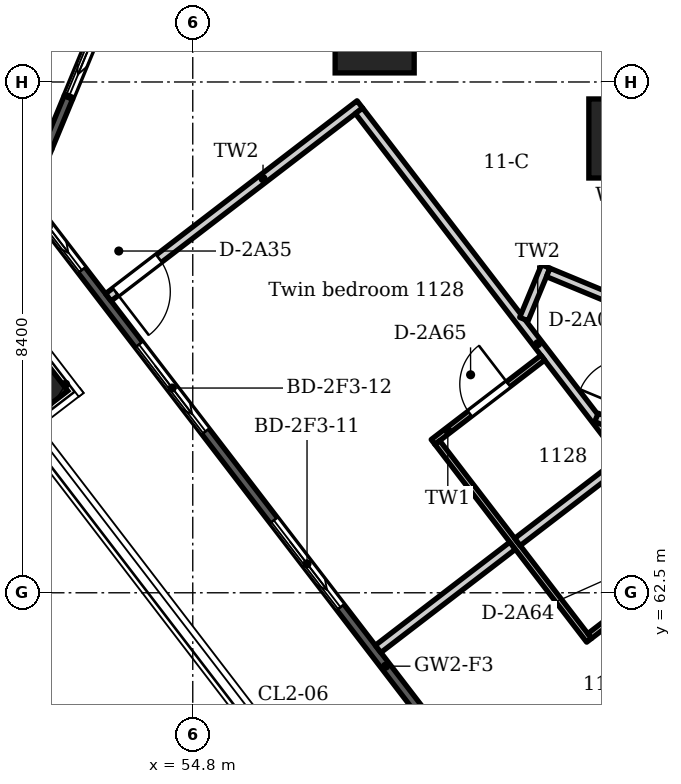
"""IFC4 building model, lengths in metres.
Left out: names, types, materials, properties, quantities, classifications, styles, units other than length and angle.
Written with IfcOpenShell. Run it as: python <this file> out.ifc"""

import sys

from ifc_helpers import new_model, si_unit, direction, frame, frame_2d, origin, origin_2d, place, context, subcontext, project, spatial, polyline, rectangle, circle, outline, extrude, element, fill, save


model = new_model("IFC4")
c1 = context("Model", 3, precision=1e-05, world=origin(), true_north=direction((0.0, 1.0)))
c2 = subcontext(c1, "Body", "Model", "MODEL_VIEW")
j1 = project(units=[si_unit("LENGTHUNIT", "METRE"), si_unit("PLANEANGLEUNIT", "RADIAN")], contexts=[c1])
p1 = place(None, origin())
s1 = spatial("IfcSite", under=j1, at=p1, CompositionType="ELEMENT")
p2 = place(p1, origin())
s2 = spatial("IfcBuilding", under=s1, at=p2, CompositionType="ELEMENT")
p3 = place(p2, frame((0.0, 0.0, 50.4)))
s3 = spatial("IfcBuildingStorey", under=s2, at=p3, CompositionType="ELEMENT", Elevation=50.4)
p4 = place(p3, frame((52.188, 65.929, -0.35), z_axis=(0.0, 0.0, 1.0), x_axis=(-0.608761429009, 0.793353340291, 0.0)))
e1 = element("IfcColumn", 1, at=p4, inside=s3, PredefinedType="COLUMN", context=c2, shape_type="SweptSolid", body=[
    extrude(rectangle(XDim=0.85, YDim=0.75, at=origin_2d()), origin(), (0.0, 0.0, 1.0), 3.95),
])
for number, where, z_axis, x_axis in (
    (2, (61.964, 69.971, -0.35), (0.0, 0.0, 1.0), (1.0, 0.0, 0.0)),
    (3, (57.791, 71.699, -0.35), (0.0, 0.0, 1.0), (1.0, 0.0, 0.0)),
):
    element("IfcColumn", number, at=place(p3, frame(where, z_axis=z_axis, x_axis=x_axis)), inside=s3, PredefinedType="COLUMN", context=c2, shape_type="SweptSolid", body=[
        extrude(circle(Radius=0.65, at=origin_2d()), origin(), (0.0, 0.0, 1.0), 3.95),
    ])
p5 = place(p3, frame((52.372, 69.722, 0.0), z_axis=(0.0, 0.0, 1.0), x_axis=(0.382603377961, 0.923912688068, 0.0)))
e4 = element("IfcWall", 4, at=p5, inside=s3, PredefinedType="SOLIDWALL", context=c2, shape_type="SweptSolid", body=[
    extrude(outline(polyline([(0.11, -0.075), (1.0, -0.075), (1.0, 0.075), (0.11, 0.075), (0.11, -0.075)])), origin(), (0.0, 0.0, 1.0), 3.3),
])
p6 = place(p3, frame((52.755, 70.646, 0.0), z_axis=(0.0, 0.0, 1.0), x_axis=(0.382771661121, 0.923842982028, 0.0)))
e5 = element("IfcWall", 5, at=p6, inside=s3, PredefinedType="SOLIDWALL", context=c2, shape_type="SweptSolid", body=[
    extrude(outline(polyline([(0.0, -0.075), (1.9, -0.075), (1.9, 0.075), (0.0, 0.075), (0.0, -0.075)])), origin(), (0.0, 0.0, 1.0), 2.65),
])
p7 = place(p6, frame((0.05, 0.0, 0.0)))
e6 = element("IfcOpeningElement", 6, at=p7, cuts=e5, PredefinedType="OPENING", context=c2, shape_type="SweptSolid", body=[
    extrude(rectangle(XDim=1.8, YDim=2.6, at=frame_2d((0.9, 1.3))), frame((0.0, 0.085, 0.0), z_axis=(0.0, -1.0, 0.0), x_axis=(1.0, 0.0, 0.0)), (0.0, 0.0, 1.0), 0.17),
])
p8 = place(p3, frame((79.969, 32.624, 0.0), z_axis=(0.0, 0.0, 1.0), x_axis=(-0.608761526367, 0.793353265585, 0.0)))
e7 = element("IfcWall", 7, at=p8, inside=s3, PredefinedType="SOLIDWALL", context=c2, shape_type="SweptSolid", body=[
    extrude(outline(polyline([(0.149, 0.075), (0.149, -0.075), (47.217, -0.075), (47.217, 0.075), (0.149, 0.075)])), origin(), (0.0, 0.0, 1.0), 3.3),
])
p9 = place(p8, frame((1.222, 0.0, 0.0)))
e8 = element("IfcOpeningElement", 8, at=p9, cuts=e7, PredefinedType="OPENING", context=c2, shape_type="SweptSolid", body=[
    extrude(rectangle(XDim=1.8, YDim=2.6, at=frame_2d((0.9, 1.3))), frame((0.0, 0.085, 0.0), z_axis=(0.0, -1.0, 0.0), x_axis=(1.0, 0.0, 0.0)), (0.0, 0.0, 1.0), 0.17),
])
p10 = place(p8, frame((4.565, 0.0, 0.0)))
e9 = element("IfcOpeningElement", 9, at=p10, cuts=e7, PredefinedType="OPENING", context=c2, shape_type="SweptSolid", body=[
    extrude(rectangle(XDim=1.8, YDim=2.6, at=frame_2d((0.9, 1.3))), frame((0.0, 0.085, 0.0), z_axis=(0.0, -1.0, 0.0), x_axis=(1.0, 0.0, 0.0)), (0.0, 0.0, 1.0), 0.17),
])
p11 = place(p8, frame((8.209, 0.0, 0.0)))
e10 = element("IfcOpeningElement", 10, at=p11, cuts=e7, PredefinedType="OPENING", context=c2, shape_type="SweptSolid", body=[
    extrude(rectangle(XDim=1.8, YDim=2.6, at=frame_2d((0.9, 1.3))), frame((0.0, 0.085, 0.0), z_axis=(0.0, -1.0, 0.0), x_axis=(1.0, 0.0, 0.0)), (0.0, 0.0, 1.0), 0.17),
])
p12 = place(p8, frame((12.453, 0.0, 0.0)))
e11 = element("IfcOpeningElement", 11, at=p12, cuts=e7, PredefinedType="OPENING", context=c2, shape_type="SweptSolid", body=[
    extrude(rectangle(XDim=1.8, YDim=2.6, at=frame_2d((0.9, 1.3))), frame((0.0, 0.085, 0.0), z_axis=(0.0, -1.0, 0.0), x_axis=(1.0, 0.0, 0.0)), (0.0, 0.0, 1.0), 0.17),
])
p13 = place(p8, frame((15.496, 0.0, 0.0)))
e12 = element("IfcOpeningElement", 12, at=p13, cuts=e7, PredefinedType="OPENING", context=c2, shape_type="SweptSolid", body=[
    extrude(rectangle(XDim=1.8, YDim=2.6, at=frame_2d((0.9, 1.3))), frame((0.0, 0.085, 0.0), z_axis=(0.0, -1.0, 0.0), x_axis=(1.0, 0.0, 0.0)), (0.0, 0.0, 1.0), 0.17),
])
p14 = place(p8, frame((18.84, 0.0, 0.15)))
e13 = element("IfcOpeningElement", 13, at=p14, cuts=e7, PredefinedType="OPENING", context=c2, shape_type="SweptSolid", body=[
    extrude(rectangle(XDim=2.4, YDim=2.45, at=frame_2d((1.2, 1.225))), frame((0.0, 0.085, 0.0), z_axis=(0.0, -1.0, 0.0), x_axis=(1.0, 0.0, 0.0)), (0.0, 0.0, 1.0), 0.17),
])
p15 = place(p8, frame((22.783, 0.0, 0.0)))
e14 = element("IfcOpeningElement", 14, at=p15, cuts=e7, PredefinedType="OPENING", context=c2, shape_type="SweptSolid", body=[
    extrude(rectangle(XDim=1.8, YDim=2.6, at=frame_2d((0.9, 1.3))), frame((0.0, 0.085, 0.0), z_axis=(0.0, -1.0, 0.0), x_axis=(1.0, 0.0, 0.0)), (0.0, 0.0, 1.0), 0.17),
])
p16 = place(p8, frame((26.127, 0.0, 0.15)))
e15 = element("IfcOpeningElement", 15, at=p16, cuts=e7, PredefinedType="OPENING", context=c2, shape_type="SweptSolid", body=[
    extrude(rectangle(XDim=2.4, YDim=2.45, at=frame_2d((1.2, 1.225))), frame((0.0, 0.085, 0.0), z_axis=(0.0, -1.0, 0.0), x_axis=(1.0, 0.0, 0.0)), (0.0, 0.0, 1.0), 0.17),
])
p17 = place(p8, frame((30.071, 0.0, 0.0)))
e16 = element("IfcOpeningElement", 16, at=p17, cuts=e7, PredefinedType="OPENING", context=c2, shape_type="SweptSolid", body=[
    extrude(rectangle(XDim=1.8, YDim=2.6, at=frame_2d((0.9, 1.3))), frame((0.0, 0.085, 0.0), z_axis=(0.0, -1.0, 0.0), x_axis=(1.0, 0.0, 0.0)), (0.0, 0.0, 1.0), 0.17),
])
p18 = place(p8, frame((33.114, 0.0, 0.0)))
e17 = element("IfcOpeningElement", 17, at=p18, cuts=e7, PredefinedType="OPENING", context=c2, shape_type="SweptSolid", body=[
    extrude(rectangle(XDim=1.8, YDim=2.6, at=frame_2d((0.9, 1.3))), frame((0.0, 0.085, 0.0), z_axis=(0.0, -1.0, 0.0), x_axis=(1.0, 0.0, 0.0)), (0.0, 0.0, 1.0), 0.17),
])
p19 = place(p8, frame((37.358, 0.0, 0.0)))
e18 = element("IfcOpeningElement", 18, at=p19, cuts=e7, PredefinedType="OPENING", context=c2, shape_type="SweptSolid", body=[
    extrude(rectangle(XDim=1.8, YDim=2.6, at=frame_2d((0.9, 1.3))), frame((0.0, 0.085, 0.0), z_axis=(0.0, -1.0, 0.0), x_axis=(1.0, 0.0, 0.0)), (0.0, 0.0, 1.0), 0.17),
])
p20 = place(p8, frame((41.001, 0.0, 0.0)))
e19 = element("IfcOpeningElement", 19, at=p20, cuts=e7, PredefinedType="OPENING", context=c2, shape_type="SweptSolid", body=[
    extrude(rectangle(XDim=1.8, YDim=2.6, at=frame_2d((0.9, 1.3))), frame((0.0, 0.085, 0.0), z_axis=(0.0, -1.0, 0.0), x_axis=(1.0, 0.0, 0.0)), (0.0, 0.0, 1.0), 0.17),
])
p21 = place(p8, frame((44.345, 0.0, 0.0)))
e20 = element("IfcOpeningElement", 20, at=p21, cuts=e7, PredefinedType="OPENING", context=c2, shape_type="SweptSolid", body=[
    extrude(rectangle(XDim=1.8, YDim=2.6, at=frame_2d((0.9, 1.3))), frame((0.0, 0.085, 0.0), z_axis=(0.0, -1.0, 0.0), x_axis=(1.0, 0.0, 0.0)), (0.0, 0.0, 1.0), 0.17),
])
p22 = place(p3, frame((53.412, 67.358, 0.0), z_axis=(0.0, 0.0, 1.0), x_axis=(0.793382437727, 0.608723506616, 0.0)))
e21 = element("IfcWall", 21, at=p22, inside=s3, PredefinedType="PARTITIONING", context=c2, shape_type="SweptSolid", body=[
    extrude(rectangle(XDim=5.213, YDim=0.15, at=frame_2d((2.606, 0.0))), origin(), (0.0, 0.0, 1.0), 3.3),
])
p23 = place(p22, frame((0.15, 0.0, 0.0)))
e22 = element("IfcOpeningElement", 22, at=p23, cuts=e21, PredefinedType="OPENING", context=c2, shape_type="SweptSolid", body=[
    extrude(rectangle(XDim=0.9, YDim=2.1, at=frame_2d((0.45, 1.05))), frame((0.0, 0.085, 0.0), z_axis=(0.0, -1.0, 0.0), x_axis=(1.0, 0.0, 0.0)), (0.0, 0.0, 1.0), 0.17),
])
p24 = place(p3, frame((57.534, 70.427, 0.0), z_axis=(0.0, 0.0, 1.0), x_axis=(0.608794371867, -0.793328061261, 0.0)))
e23 = element("IfcWall", 23, at=p24, inside=s3, PredefinedType="PARTITIONING", context=c2, shape_type="SweptSolid", body=[
    extrude(rectangle(XDim=19.759, YDim=0.15, at=frame_2d((9.88, 0.0))), origin(), (0.0, 0.0, 1.0), 3.3),
])
p25 = place(p24, frame((18.293, 0.0, 0.0)))
e24 = element("IfcOpeningElement", 24, at=p25, cuts=e23, PredefinedType="OPENING", context=c2, shape_type="SweptSolid", body=[
    extrude(rectangle(XDim=0.9, YDim=2.1, at=frame_2d((0.45, 1.05))), frame((0.0, 0.085, 0.0), z_axis=(0.0, -1.0, 0.0), x_axis=(1.0, 0.0, 0.0)), (0.0, 0.0, 1.0), 0.17),
])
p26 = place(p24, frame((17.093, 0.0, 0.0)))
e25 = element("IfcOpeningElement", 25, at=p26, cuts=e23, PredefinedType="OPENING", context=c2, shape_type="SweptSolid", body=[
    extrude(rectangle(XDim=0.9, YDim=2.1, at=frame_2d((0.45, 1.05))), frame((0.0, 0.085, 0.0), z_axis=(0.0, -1.0, 0.0), x_axis=(1.0, 0.0, 0.0)), (0.0, 0.0, 1.0), 0.17),
])
p27 = place(p24, frame((11.006, 0.0, 0.0)))
e26 = element("IfcOpeningElement", 26, at=p27, cuts=e23, PredefinedType="OPENING", context=c2, shape_type="SweptSolid", body=[
    extrude(rectangle(XDim=0.9, YDim=2.1, at=frame_2d((0.45, 1.05))), frame((0.0, 0.085, 0.0), z_axis=(0.0, -1.0, 0.0), x_axis=(1.0, 0.0, 0.0)), (0.0, 0.0, 1.0), 0.17),
])
p28 = place(p24, frame((9.806, 0.0, 0.0)))
e27 = element("IfcOpeningElement", 27, at=p28, cuts=e23, PredefinedType="OPENING", context=c2, shape_type="SweptSolid", body=[
    extrude(rectangle(XDim=0.9, YDim=2.1, at=frame_2d((0.45, 1.05))), frame((0.0, 0.085, 0.0), z_axis=(0.0, -1.0, 0.0), x_axis=(1.0, 0.0, 0.0)), (0.0, 0.0, 1.0), 0.17),
])
p29 = place(p3, frame((57.848, 61.576, 0.0), z_axis=(0.0, 0.0, 1.0), x_axis=(0.793280814045, 0.608855935397, 0.0)))
e28 = element("IfcWall", 28, at=p29, inside=s3, PredefinedType="PARTITIONING", context=c2, shape_type="SweptSolid", body=[
    extrude(rectangle(XDim=2.789, YDim=0.15, at=frame_2d((1.395, 0.0))), origin(), (0.0, 0.0, 1.0), 3.3),
])
p30 = place(p3, frame((58.751, 64.981, 0.0), z_axis=(0.0, 0.0, 1.0), x_axis=(0.793437070432, 0.608652294224, 0.0)))
e29 = element("IfcWall", 29, at=p30, inside=s3, PredefinedType="PARTITIONING", context=c2, shape_type="SweptSolid", body=[
    extrude(rectangle(XDim=2.275, YDim=0.1, at=frame_2d((1.138, 0.0))), origin(), (0.0, 0.0, 1.0), 3.3),
])
p31 = place(p30, frame((0.762, 0.0, 0.0)))
e30 = element("IfcOpeningElement", 30, at=p31, cuts=e29, PredefinedType="OPENING", context=c2, shape_type="SweptSolid", body=[
    extrude(rectangle(XDim=0.8, YDim=2.1, at=frame_2d((0.4, 1.05))), frame((0.0, 0.06, 0.0), z_axis=(0.0, -1.0, 0.0), x_axis=(1.0, 0.0, 0.0)), (0.0, 0.0, 1.0), 0.12),
])
p32 = place(p3, frame((58.821, 64.971, 0.0), z_axis=(0.0, 0.0, 1.0), x_axis=(0.608766496324, -0.793349451978, 0.0)))
e31 = element("IfcWall", 31, at=p32, inside=s3, PredefinedType="PARTITIONING", context=c2, shape_type="SweptSolid", body=[
    extrude(rectangle(XDim=4.1, YDim=0.1, at=frame_2d((2.05, 0.0))), origin(), (0.0, 0.0, 1.0), 3.3),
])
p33 = place(p3, frame((60.066, 58.686, 0.0), z_axis=(0.0, 0.0, 1.0), x_axis=(0.793444149255, 0.608643066184, 0.0)))
e32 = element("IfcWall", 32, at=p33, inside=s3, PredefinedType="PARTITIONING", context=c2, shape_type="SweptSolid", body=[
    extrude(rectangle(XDim=5.064, YDim=0.15, at=frame_2d((2.532, 0.0))), origin(), (0.0, 0.0, 1.0), 3.3),
])
p34 = place(p3, frame((60.14, 63.335, 0.0), z_axis=(0.0, 0.0, 1.0), x_axis=(0.79342025342, 0.608674216197, 0.0)))
e33 = element("IfcWall", 33, at=p34, inside=s3, PredefinedType="PARTITIONING", context=c2, shape_type="SweptSolid", body=[
    extrude(rectangle(XDim=2.175, YDim=0.15, at=frame_2d((1.088, 0.0))), origin(), (0.0, 0.0, 1.0), 3.3),
])
p35 = place(p3, frame((60.246, 67.0, 0.0), z_axis=(0.0, 0.0, 1.0), x_axis=(0.383080061035, 0.923715143774, 0.0)))
e34 = element("IfcWall", 34, at=p35, inside=s3, PredefinedType="PARTITIONING", context=c2, shape_type="SweptSolid", body=[
    extrude(rectangle(XDim=0.938, YDim=0.15, at=frame_2d((0.469, 0.0))), origin(), (0.0, 0.0, 1.0), 3.3),
])
p36 = place(p3, frame((60.645, 67.768, 0.0), z_axis=(0.0, 0.0, 1.0), x_axis=(0.923799320148, -0.382877024767, 0.0)))
e35 = element("IfcWall", 35, at=p36, inside=s3, PredefinedType="PARTITIONING", context=c2, shape_type="SweptSolid", body=[
    extrude(rectangle(XDim=2.025, YDim=0.15, at=frame_2d((1.013, 0.0))), origin(), (0.0, 0.0, 1.0), 3.3),
])
p37 = place(p3, frame((61.327, 61.788, 0.0), z_axis=(0.0, 0.0, 1.0), x_axis=(0.79342025342, 0.608674216197, 0.0)))
e36 = element("IfcWall", 36, at=p37, inside=s3, PredefinedType="PARTITIONING", context=c2, shape_type="SweptSolid", body=[
    extrude(rectangle(XDim=2.175, YDim=0.1, at=frame_2d((1.088, 0.0))), origin(), (0.0, 0.0, 1.0), 3.3),
])
p38 = place(p37, frame((0.688, 0.0, 0.0)))
e37 = element("IfcOpeningElement", 37, at=p38, cuts=e36, PredefinedType="OPENING", context=c2, shape_type="SweptSolid", body=[
    extrude(rectangle(XDim=0.8, YDim=2.1, at=frame_2d((0.4, 1.05))), frame((0.0, 0.06, 0.0), z_axis=(0.0, -1.0, 0.0), x_axis=(1.0, 0.0, 0.0)), (0.0, 0.0, 1.0), 0.12),
])
p39 = place(p3, frame((61.439, 65.383, 0.0), z_axis=(0.0, 0.0, 1.0), x_axis=(0.923599819829, -0.383358021714, 0.0)))
e38 = element("IfcWall", 38, at=p39, inside=s3, PredefinedType="PARTITIONING", context=c2, shape_type="SweptSolid", body=[
    extrude(rectangle(XDim=0.4, YDim=0.15, at=frame_2d((0.2, 0.0))), origin(), (0.0, 0.0, 1.0), 3.3),
])
p40 = place(p7, origin())
e39 = element("IfcDoor", 39, at=p40, inside=s3, OperationType="SLIDING_TO_LEFT", PredefinedType="DOOR", context=c2, shape_type="SweptSolid", body=[
    extrude(rectangle(XDim=1.8, YDim=2.6, at=frame_2d((0.9, 1.3))), frame((0.0, 0.025, 0.0), z_axis=(0.0, -1.0, 0.0), x_axis=(1.0, 0.0, 0.0)), (0.0, 0.0, 1.0), 0.05),
])
fill(e6, e39)
p41 = place(p19, origin())
e40 = element("IfcDoor", 40, at=p41, inside=s3, OperationType="SLIDING_TO_LEFT", PredefinedType="DOOR", context=c2, shape_type="SweptSolid", body=[
    extrude(rectangle(XDim=1.8, YDim=2.6, at=frame_2d((0.9, 1.3))), frame((0.0, 0.025, 0.0), z_axis=(0.0, -1.0, 0.0), x_axis=(1.0, 0.0, 0.0)), (0.0, 0.0, 1.0), 0.05),
])
fill(e18, e40)
p42 = place(p20, origin())
e41 = element("IfcDoor", 41, at=p42, inside=s3, OperationType="SLIDING_TO_LEFT", PredefinedType="DOOR", context=c2, shape_type="SweptSolid", body=[
    extrude(rectangle(XDim=1.8, YDim=2.6, at=frame_2d((0.9, 1.3))), frame((0.0, 0.025, 0.0), z_axis=(0.0, -1.0, 0.0), x_axis=(1.0, 0.0, 0.0)), (0.0, 0.0, 1.0), 0.05),
])
fill(e19, e41)
p43 = place(p21, origin())
e42 = element("IfcDoor", 42, at=p43, inside=s3, OperationType="SLIDING_TO_LEFT", PredefinedType="DOOR", context=c2, shape_type="SweptSolid", body=[
    extrude(rectangle(XDim=1.8, YDim=2.6, at=frame_2d((0.9, 1.3))), frame((0.0, 0.025, 0.0), z_axis=(0.0, -1.0, 0.0), x_axis=(1.0, 0.0, 0.0)), (0.0, 0.0, 1.0), 0.05),
])
fill(e20, e42)
p44 = place(p23, frame((0.9, 0.0, 0.0), z_axis=(0.0, 0.0, 1.0), x_axis=(-1.0, 0.0, 0.0)))
e43 = element("IfcDoor", 43, at=p44, inside=s3, OperationType="SINGLE_SWING_RIGHT", PredefinedType="DOOR", context=c2, shape_type="SweptSolid", body=[
    extrude(rectangle(XDim=0.9, YDim=2.1, at=frame_2d((0.45, 1.05))), frame((0.0, 0.025, 0.0), z_axis=(0.0, -1.0, 0.0), x_axis=(1.0, 0.0, 0.0)), (0.0, 0.0, 1.0), 0.05),
])
fill(e22, e43)
p45 = place(p31, origin())
e44 = element("IfcDoor", 44, at=p45, inside=s3, OperationType="SINGLE_SWING_RIGHT", PredefinedType="DOOR", context=c2, shape_type="SweptSolid", body=[
    extrude(rectangle(XDim=0.8, YDim=2.1, at=frame_2d((0.4, 1.05))), frame((0.0, 0.025, 0.0), z_axis=(0.0, -1.0, 0.0), x_axis=(1.0, 0.0, 0.0)), (0.0, 0.0, 1.0), 0.05),
])
fill(e30, e44)
save(model, sys.argv[1])
